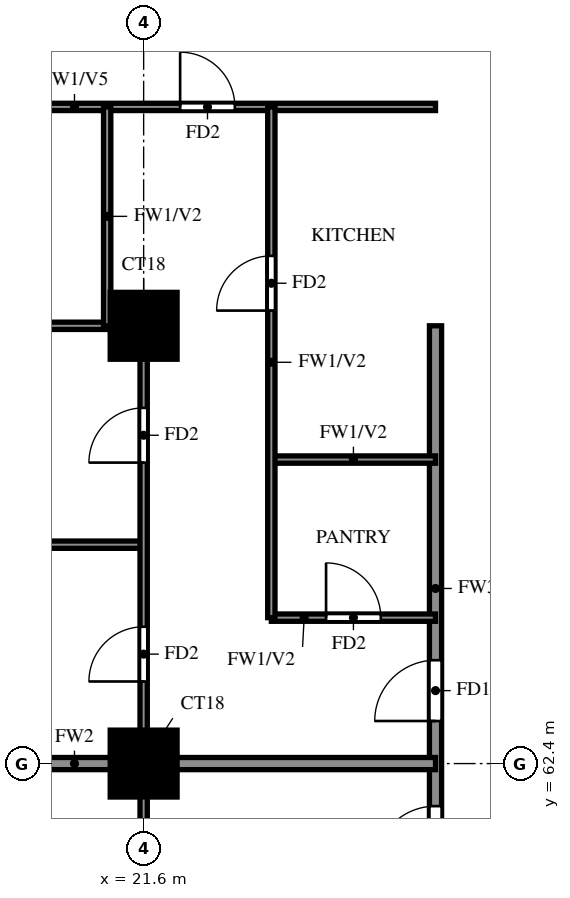
"""IFC4 building model, lengths in metres.
Left out: names, types, materials, properties, quantities, classifications, styles, units other than length and angle.
Written with IfcOpenShell. Run it as: python <this file> out.ifc"""

import sys

from ifc_helpers import new_model, si_unit, direction, frame, frame_2d, origin, origin_2d, place, context, subcontext, project, spatial, rectangle, extrude, source, transform, mapped, element, fill, save


model = new_model("IFC4")
c1 = context("Model", 3, precision=1e-05, world=origin(), true_north=direction((0.0, 1.0)))
c2 = subcontext(c1, "Body", "Model", "MODEL_VIEW")
j1 = project(units=[si_unit("LENGTHUNIT", "METRE"), si_unit("PLANEANGLEUNIT", "RADIAN")], contexts=[c1])
p1 = place(None, origin())
s1 = spatial("IfcSite", under=j1, at=p1, CompositionType="ELEMENT")
p2 = place(p1, origin())
s2 = spatial("IfcBuilding", under=s1, at=p2, CompositionType="ELEMENT")
p3 = place(p2, frame((0.0, 0.0, 116.5)))
s3 = spatial("IfcBuildingStorey", under=s2, at=p3, CompositionType="ELEMENT", Elevation=116.5)
m1 = source(origin(), c2, "Body", "SweptSolid", [
    extrude(rectangle(XDim=1.1, YDim=1.1, at=origin_2d()), origin(), (0.0, 0.0, 1.0), 3.2),
])
for number, where, z_axis, x_axis in (
    (1, (21.6, 62.4, 0.0), (0.0, 0.0, 1.0), (1.0, 0.0, 0.0)),
    (2, (21.6, 69.6, 0.0), (0.0, 0.0, 1.0), (1.0, 0.0, 0.0)),
):
    element("IfcColumn", number, at=place(p3, frame(where, z_axis=z_axis, x_axis=x_axis)), inside=s3, PredefinedType="COLUMN", context=c2, shape_type="MappedRepresentation", body=[
        mapped(m1, transform((0.0, 0.0, 0.0))),
    ])
p4 = place(p3, frame((26.4, 60.0, 0.0), z_axis=(0.0, 0.0, 1.0), x_axis=(0.0, 1.0, 0.0)))
e3 = element("IfcWall", 3, at=p4, inside=s3, PredefinedType="SOLIDWALL", context=c2, shape_type="SweptSolid", body=[
    extrude(rectangle(XDim=9.6, YDim=0.2, at=frame_2d((4.8, 0.0))), origin(), (0.0, 0.0, 1.0), 3.2),
])
p5 = place(p4, frame((0.7, 0.0, 0.0)))
e4 = element("IfcOpeningElement", 4, at=p5, cuts=e3, PredefinedType="OPENING", context=c2, shape_type="SweptSolid", body=[
    extrude(rectangle(XDim=1.0, YDim=2.1, at=frame_2d((0.5, 1.05))), frame((0.0, 0.11, 0.0), z_axis=(0.0, -1.0, 0.0), x_axis=(1.0, 0.0, 0.0)), (0.0, 0.0, 1.0), 0.22),
])
p6 = place(p4, frame((3.1, 0.0, 0.0)))
e5 = element("IfcOpeningElement", 5, at=p6, cuts=e3, PredefinedType="OPENING", context=c2, shape_type="SweptSolid", body=[
    extrude(rectangle(XDim=1.0, YDim=2.1, at=frame_2d((0.5, 1.05))), frame((0.0, 0.11, 0.0), z_axis=(0.0, -1.0, 0.0), x_axis=(1.0, 0.0, 0.0)), (0.0, 0.0, 1.0), 0.22),
])
p7 = place(p3, frame((14.525, 62.4, 0.0), z_axis=(0.0, 0.0, 1.0), x_axis=(1.0, 0.0, 0.0)))
e6 = element("IfcWall", 6, at=p7, inside=s3, PredefinedType="SOLIDWALL", context=c2, shape_type="SweptSolid", body=[
    extrude(rectangle(XDim=11.875, YDim=0.2, at=frame_2d((5.938, 0.0))), origin(), (0.0, 0.0, 1.0), 3.2),
])
p8 = place(p3, frame((23.7, 64.8, 0.0), z_axis=(0.0, 0.0, 1.0), x_axis=(1.0, 0.0, 0.0)))
e7 = element("IfcWall", 7, at=p8, inside=s3, PredefinedType="PARTITIONING", context=c2, shape_type="SweptSolid", body=[
    extrude(rectangle(XDim=2.7, YDim=0.12, at=frame_2d((1.35, 0.0))), origin(), (0.0, 0.0, 1.0), 3.2),
])
p9 = place(p8, frame((0.9, 0.0, 0.0)))
e8 = element("IfcOpeningElement", 8, at=p9, cuts=e7, PredefinedType="OPENING", context=c2, shape_type="SweptSolid", body=[
    extrude(rectangle(XDim=0.9, YDim=2.1, at=frame_2d((0.45, 1.05))), frame((0.0, 0.07, 0.0), z_axis=(0.0, -1.0, 0.0), x_axis=(1.0, 0.0, 0.0)), (0.0, 0.0, 1.0), 0.14),
])
p10 = place(p3, frame((14.525, 66.0, 0.0), z_axis=(0.0, 0.0, 1.0), x_axis=(1.0, 0.0, 0.0)))
e9 = element("IfcWall", 9, at=p10, inside=s3, PredefinedType="PARTITIONING", context=c2, shape_type="SweptSolid", body=[
    extrude(rectangle(XDim=7.075, YDim=0.12, at=frame_2d((3.538, 0.0))), origin(), (0.0, 0.0, 1.0), 2.3),
])
p11 = place(p3, frame((23.7, 67.4, 0.0), z_axis=(0.0, 0.0, 1.0), x_axis=(1.0, 0.0, 0.0)))
e10 = element("IfcWall", 10, at=p11, inside=s3, PredefinedType="PARTITIONING", context=c2, shape_type="SweptSolid", body=[
    extrude(rectangle(XDim=2.7, YDim=0.12, at=frame_2d((1.35, 0.0))), origin(), (0.0, 0.0, 1.0), 3.2),
])
p12 = place(p3, frame((14.525, 69.6, 0.0), z_axis=(0.0, 0.0, 1.0), x_axis=(1.0, 0.0, 0.0)))
e11 = element("IfcWall", 11, at=p12, inside=s3, PredefinedType="PARTITIONING", context=c2, shape_type="SweptSolid", body=[
    extrude(rectangle(XDim=7.075, YDim=0.12, at=frame_2d((3.538, 0.0))), origin(), (0.0, 0.0, 1.0), 3.2),
])
p13 = place(p12, frame((2.837, 0.0, 0.0)))
e12 = element("IfcOpeningElement", 12, at=p13, cuts=e11, PredefinedType="OPENING", context=c2, shape_type="SweptSolid", body=[
    extrude(rectangle(XDim=0.8, YDim=2.1, at=frame_2d((0.4, 1.05))), frame((0.0, 0.07, 0.0), z_axis=(0.0, -1.0, 0.0), x_axis=(1.0, 0.0, 0.0)), (0.0, 0.0, 1.0), 0.14),
])
p14 = place(p3, frame((14.525, 73.2, 0.0), z_axis=(0.0, 0.0, 1.0), x_axis=(1.0, 0.0, 0.0)))
e13 = element("IfcWall", 13, at=p14, inside=s3, PredefinedType="PARTITIONING", context=c2, shape_type="SweptSolid", body=[
    extrude(rectangle(XDim=11.875, YDim=0.12, at=frame_2d((5.938, 0.0))), origin(), (0.0, 0.0, 1.0), 2.3),
])
p15 = place(p14, frame((7.675, 0.0, 0.0)))
e14 = element("IfcOpeningElement", 14, at=p15, cuts=e13, PredefinedType="OPENING", context=c2, shape_type="SweptSolid", body=[
    extrude(rectangle(XDim=0.9, YDim=2.1, at=frame_2d((0.45, 1.05))), frame((0.0, 0.07, 0.0), z_axis=(0.0, -1.0, 0.0), x_axis=(1.0, 0.0, 0.0)), (0.0, 0.0, 1.0), 0.14),
])
p16 = place(p3, frame((21.0, 69.6, 0.0), z_axis=(0.0, 0.0, 1.0), x_axis=(0.0, 1.0, 0.0)))
e15 = element("IfcWall", 15, at=p16, inside=s3, PredefinedType="PARTITIONING", context=c2, shape_type="SweptSolid", body=[
    extrude(rectangle(XDim=3.6, YDim=0.12, at=frame_2d((1.8, 0.0))), origin(), (0.0, 0.0, 1.0), 3.2),
])
p17 = place(p3, frame((21.6, 48.0, 0.0), z_axis=(0.0, 0.0, 1.0), x_axis=(0.0, 1.0, 0.0)))
e16 = element("IfcWall", 16, at=p17, inside=s3, PredefinedType="PARTITIONING", context=c2, shape_type="SweptSolid", body=[
    extrude(rectangle(XDim=21.6, YDim=0.12, at=frame_2d((10.8, 0.0))), origin(), (0.0, 0.0, 1.0), 3.2),
])
p18 = place(p17, frame((1.35, 0.0, 0.0)))
e17 = element("IfcOpeningElement", 17, at=p18, cuts=e16, PredefinedType="OPENING", context=c2, shape_type="SweptSolid", body=[
    extrude(rectangle(XDim=0.9, YDim=2.1, at=frame_2d((0.45, 1.05))), frame((0.0, 0.07, 0.0), z_axis=(0.0, -1.0, 0.0), x_axis=(1.0, 0.0, 0.0)), (0.0, 0.0, 1.0), 0.14),
])
p19 = place(p17, frame((7.95, 0.0, 0.0)))
e18 = element("IfcOpeningElement", 18, at=p19, cuts=e16, PredefinedType="OPENING", context=c2, shape_type="SweptSolid", body=[
    extrude(rectangle(XDim=1.5, YDim=2.1, at=frame_2d((0.75, 1.05))), frame((0.0, 0.07, 0.0), z_axis=(0.0, -1.0, 0.0), x_axis=(1.0, 0.0, 0.0)), (0.0, 0.0, 1.0), 0.14),
])
p20 = place(p17, frame((12.15, 0.0, 0.0)))
e19 = element("IfcOpeningElement", 19, at=p20, cuts=e16, PredefinedType="OPENING", context=c2, shape_type="SweptSolid", body=[
    extrude(rectangle(XDim=0.9, YDim=2.1, at=frame_2d((0.45, 1.05))), frame((0.0, 0.07, 0.0), z_axis=(0.0, -1.0, 0.0), x_axis=(1.0, 0.0, 0.0)), (0.0, 0.0, 1.0), 0.14),
])
p21 = place(p17, frame((15.75, 0.0, 0.0)))
e20 = element("IfcOpeningElement", 20, at=p21, cuts=e16, PredefinedType="OPENING", context=c2, shape_type="SweptSolid", body=[
    extrude(rectangle(XDim=0.9, YDim=2.1, at=frame_2d((0.45, 1.05))), frame((0.0, 0.07, 0.0), z_axis=(0.0, -1.0, 0.0), x_axis=(1.0, 0.0, 0.0)), (0.0, 0.0, 1.0), 0.14),
])
p22 = place(p17, frame((19.35, 0.0, 0.0)))
e21 = element("IfcOpeningElement", 21, at=p22, cuts=e16, PredefinedType="OPENING", context=c2, shape_type="SweptSolid", body=[
    extrude(rectangle(XDim=0.9, YDim=2.1, at=frame_2d((0.45, 1.05))), frame((0.0, 0.07, 0.0), z_axis=(0.0, -1.0, 0.0), x_axis=(1.0, 0.0, 0.0)), (0.0, 0.0, 1.0), 0.14),
])
p23 = place(p3, frame((23.7, 64.8, 0.0), z_axis=(0.0, 0.0, 1.0), x_axis=(0.0, 1.0, 0.0)))
e22 = element("IfcWall", 22, at=p23, inside=s3, PredefinedType="PARTITIONING", context=c2, shape_type="SweptSolid", body=[
    extrude(rectangle(XDim=8.4, YDim=0.12, at=frame_2d((4.2, 0.0))), origin(), (0.0, 0.0, 1.0), 3.2),
])
p24 = place(p23, frame((5.05, 0.0, 0.0)))
e23 = element("IfcOpeningElement", 23, at=p24, cuts=e22, PredefinedType="OPENING", context=c2, shape_type="SweptSolid", body=[
    extrude(rectangle(XDim=0.9, YDim=2.1, at=frame_2d((0.45, 1.05))), frame((0.0, 0.07, 0.0), z_axis=(0.0, -1.0, 0.0), x_axis=(1.0, 0.0, 0.0)), (0.0, 0.0, 1.0), 0.14),
])
p25 = place(p5, origin())
e24 = element("IfcDoor", 24, at=p25, inside=s3, OperationType="SINGLE_SWING_LEFT", PredefinedType="DOOR", context=c2, shape_type="SweptSolid", body=[
    extrude(rectangle(XDim=1.0, YDim=2.1, at=frame_2d((0.5, 1.05))), frame((0.0, 0.025, 0.0), z_axis=(0.0, -1.0, 0.0), x_axis=(1.0, 0.0, 0.0)), (0.0, 0.0, 1.0), 0.05),
])
fill(e4, e24)
p26 = place(p6, origin())
e25 = element("IfcDoor", 25, at=p26, inside=s3, OperationType="SINGLE_SWING_RIGHT", PredefinedType="DOOR", context=c2, shape_type="SweptSolid", body=[
    extrude(rectangle(XDim=1.0, YDim=2.1, at=frame_2d((0.5, 1.05))), frame((0.0, 0.025, 0.0), z_axis=(0.0, -1.0, 0.0), x_axis=(1.0, 0.0, 0.0)), (0.0, 0.0, 1.0), 0.05),
])
fill(e5, e25)
p27 = place(p21, origin())
e26 = element("IfcDoor", 26, at=p27, inside=s3, OperationType="SINGLE_SWING_LEFT", PredefinedType="DOOR", context=c2, shape_type="SweptSolid", body=[
    extrude(rectangle(XDim=0.9, YDim=2.1, at=frame_2d((0.45, 1.05))), frame((0.0, 0.025, 0.0), z_axis=(0.0, -1.0, 0.0), x_axis=(1.0, 0.0, 0.0)), (0.0, 0.0, 1.0), 0.05),
])
fill(e20, e26)
p28 = place(p22, origin())
e27 = element("IfcDoor", 27, at=p28, inside=s3, OperationType="SINGLE_SWING_LEFT", PredefinedType="DOOR", context=c2, shape_type="SweptSolid", body=[
    extrude(rectangle(XDim=0.9, YDim=2.1, at=frame_2d((0.45, 1.05))), frame((0.0, 0.025, 0.0), z_axis=(0.0, -1.0, 0.0), x_axis=(1.0, 0.0, 0.0)), (0.0, 0.0, 1.0), 0.05),
])
fill(e21, e27)
p29 = place(p15, origin())
e28 = element("IfcDoor", 28, at=p29, inside=s3, OperationType="SINGLE_SWING_LEFT", PredefinedType="DOOR", context=c2, shape_type="SweptSolid", body=[
    extrude(rectangle(XDim=0.9, YDim=2.1, at=frame_2d((0.45, 1.05))), frame((0.0, 0.025, 0.0), z_axis=(0.0, -1.0, 0.0), x_axis=(1.0, 0.0, 0.0)), (0.0, 0.0, 1.0), 0.05),
])
fill(e14, e28)
p30 = place(p9, origin())
e29 = element("IfcDoor", 29, at=p30, inside=s3, OperationType="SINGLE_SWING_LEFT", PredefinedType="DOOR", context=c2, shape_type="SweptSolid", body=[
    extrude(rectangle(XDim=0.9, YDim=2.1, at=frame_2d((0.45, 1.05))), frame((0.0, 0.025, 0.0), z_axis=(0.0, -1.0, 0.0), x_axis=(1.0, 0.0, 0.0)), (0.0, 0.0, 1.0), 0.05),
])
fill(e8, e29)
p31 = place(p24, origin())
e30 = element("IfcDoor", 30, at=p31, inside=s3, OperationType="SINGLE_SWING_RIGHT", PredefinedType="DOOR", context=c2, shape_type="SweptSolid", body=[
    extrude(rectangle(XDim=0.9, YDim=2.1, at=frame_2d((0.45, 1.05))), frame((0.0, 0.025, 0.0), z_axis=(0.0, -1.0, 0.0), x_axis=(1.0, 0.0, 0.0)), (0.0, 0.0, 1.0), 0.05),
])
fill(e23, e30)
save(model, sys.argv[1])
